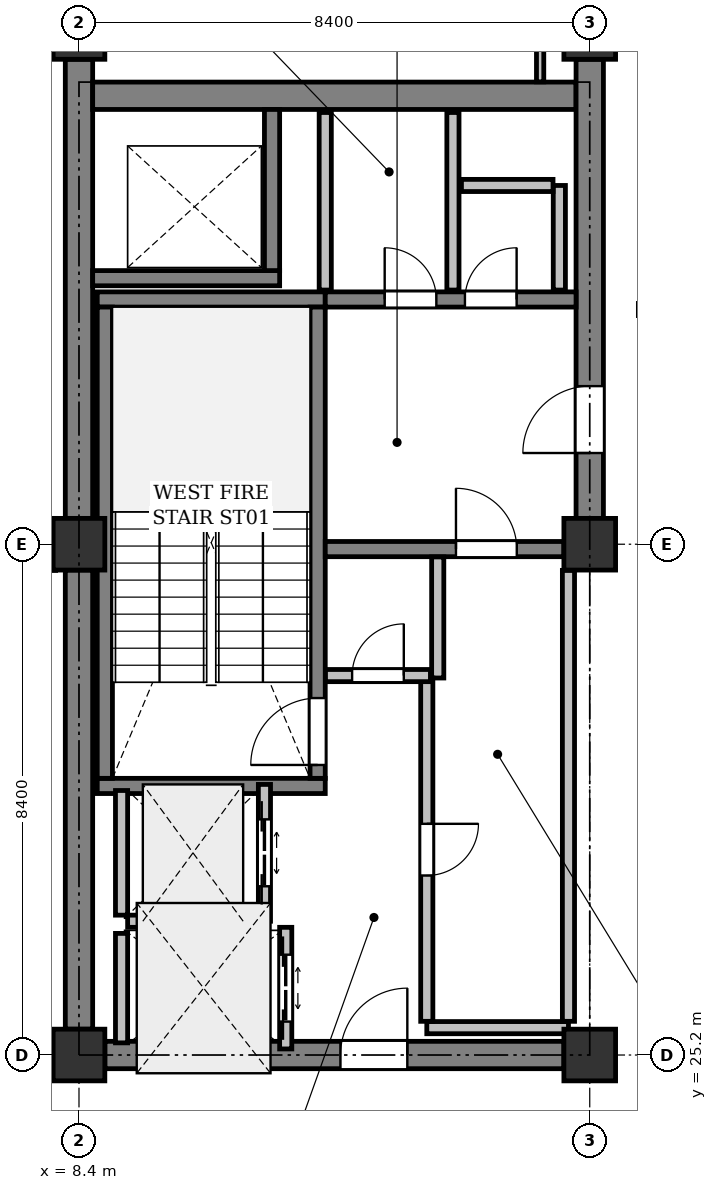
"""IFC4 building model, lengths in metres.
Left out: names, types, materials, properties, quantities, classifications, styles, units other than length and angle.
Written with IfcOpenShell. Run it as: python <this file> out.ifc"""

import sys

from ifc_helpers import new_model, si_unit, direction, frame, frame_2d, origin, origin_2d, place, context, subcontext, project, spatial, rectangle, extrude, element, fill, save


model = new_model("IFC4")
c1 = context("Model", 3, precision=1e-05, world=origin(), true_north=direction((0.0, 1.0)))
c2 = subcontext(c1, "Body", "Model", "MODEL_VIEW")
j1 = project(units=[si_unit("LENGTHUNIT", "METRE"), si_unit("PLANEANGLEUNIT", "RADIAN")], contexts=[c1])
p1 = place(None, origin())
s1 = spatial("IfcSite", under=j1, at=p1, CompositionType="ELEMENT")
p2 = place(p1, origin())
s2 = spatial("IfcBuilding", under=s1, at=p2, CompositionType="ELEMENT")
p3 = place(p2, frame((0.0, 0.0, 274.2)))
s3 = spatial("IfcBuildingStorey", under=s2, at=p3, CompositionType="ELEMENT", Elevation=274.2)
for number, where, z_axis, x_axis in (
    (1, (8.4, 25.2, 0.0), (0.0, 0.0, 1.0), (1.0, 0.0, 0.0)),
    (2, (8.4, 33.6, 0.0), (0.0, 0.0, 1.0), (1.0, 0.0, 0.0)),
    (3, (8.4, 42.0, 0.0), (0.0, 0.0, 1.0), (1.0, 0.0, 0.0)),
    (4, (16.8, 25.2, 0.0), (0.0, 0.0, 1.0), (1.0, 0.0, 0.0)),
    (5, (16.8, 33.6, 0.0), (0.0, 0.0, 1.0), (1.0, 0.0, 0.0)),
    (6, (16.8, 42.0, 0.0), (0.0, 0.0, 1.0), (1.0, 0.0, 0.0)),
):
    element("IfcColumn", number, at=place(p3, frame(where, z_axis=z_axis, x_axis=x_axis)), inside=s3, PredefinedType="COLUMN", context=c2, shape_type="SweptSolid", body=[
        extrude(rectangle(XDim=0.85, YDim=0.85, at=origin_2d()), origin(), (0.0, 0.0, 1.0), 4.0),
    ])
for number, where, z_axis, x_axis in (
    (7, (8.4, 25.625, 0.0), (0.0, 0.0, 1.0), (0.0, 1.0, 0.0)),
    (8, (8.4, 34.025, 0.0), (0.0, 0.0, 1.0), (0.0, 1.0, 0.0)),
):
    element("IfcWall", number, at=place(p3, frame(where, z_axis=z_axis, x_axis=x_axis)), inside=s3, PredefinedType="SHEAR", context=c2, shape_type="SweptSolid", body=[
        extrude(rectangle(XDim=7.55, YDim=0.45, at=frame_2d((3.775, 0.0))), origin(), (0.0, 0.0, 1.0), 3.725),
    ])
p4 = place(p3, frame((8.625, 40.975, 0.0), z_axis=(0.0, 0.0, 1.0), x_axis=(1.0, 0.0, 0.0)))
e9 = element("IfcWall", 9, at=p4, inside=s3, PredefinedType="SHEAR", context=c2, shape_type="SweptSolid", body=[
    extrude(rectangle(XDim=7.95, YDim=0.45, at=frame_2d((3.975, 0.0))), origin(), (0.0, 0.0, 1.0), 3.725),
])
p5 = place(p3, frame((16.8, 34.025, 0.0), z_axis=(0.0, 0.0, 1.0), x_axis=(0.0, 1.0, 0.0)))
e10 = element("IfcWall", 10, at=p5, inside=s3, PredefinedType="SHEAR", context=c2, shape_type="SweptSolid", body=[
    extrude(rectangle(XDim=7.55, YDim=0.45, at=frame_2d((3.775, 0.0))), origin(), (0.0, 0.0, 1.0), 3.725),
])
p6 = place(p5, frame((1.075, 0.0, 0.0)))
e11 = element("IfcOpeningElement", 11, at=p6, cuts=e10, PredefinedType="OPENING", context=c2, shape_type="SweptSolid", body=[
    extrude(rectangle(XDim=1.1, YDim=2.15, at=frame_2d((0.55, 1.075))), frame((0.0, 0.235, 0.0), z_axis=(0.0, -1.0, 0.0), x_axis=(1.0, 0.0, 0.0)), (0.0, 0.0, 1.0), 0.47),
])
p7 = place(p3, frame((8.825, 25.2, 0.0), z_axis=(0.0, 0.0, 1.0), x_axis=(1.0, 0.0, 0.0)))
e12 = element("IfcWall", 12, at=p7, inside=s3, PredefinedType="SHEAR", context=c2, shape_type="SweptSolid", body=[
    extrude(rectangle(XDim=7.55, YDim=0.45, at=frame_2d((3.775, 0.0))), origin(), (0.0, 0.0, 1.0), 3.725),
])
p8 = place(p7, frame((3.875, 0.0, 0.0)))
e13 = element("IfcOpeningElement", 13, at=p8, cuts=e12, PredefinedType="OPENING", context=c2, shape_type="SweptSolid", body=[
    extrude(rectangle(XDim=1.1, YDim=2.15, at=frame_2d((0.55, 1.075))), frame((0.0, 0.235, 0.0), z_axis=(0.0, -1.0, 0.0), x_axis=(1.0, 0.0, 0.0)), (0.0, 0.0, 1.0), 0.47),
])
for number, where, z_axis, x_axis in (
    (14, (12.45, 29.625, 0.0), (0.0, 0.0, 1.0), (-1.0, 0.0, 0.0)),
    (15, (12.45, 37.625, 0.0), (0.0, 0.0, 1.0), (-1.0, 0.0, 0.0)),
):
    element("IfcWall", number, at=place(p3, frame(where, z_axis=z_axis, x_axis=x_axis)), inside=s3, PredefinedType="SHEAR", context=c2, shape_type="SweptSolid", body=[
        extrude(rectangle(XDim=3.75, YDim=0.25, at=frame_2d((1.875, 0.0))), origin(), (0.0, 0.0, 1.0), 3.725),
    ])
p9 = place(p3, frame((12.325, 29.75, 0.0), z_axis=(0.0, 0.0, 1.0), x_axis=(0.0, 1.0, 0.0)))
e16 = element("IfcWall", 16, at=p9, inside=s3, PredefinedType="SHEAR", context=c2, shape_type="SweptSolid", body=[
    extrude(rectangle(XDim=7.75, YDim=0.25, at=frame_2d((3.875, 0.0))), origin(), (0.0, 0.0, 1.0), 3.725),
])
p10 = place(p9, frame((0.22, 0.0, 0.0)))
e17 = element("IfcOpeningElement", 17, at=p10, cuts=e16, PredefinedType="OPENING", context=c2, shape_type="SweptSolid", body=[
    extrude(rectangle(XDim=1.1, YDim=2.15, at=frame_2d((0.55, 1.075))), frame((0.0, 0.135, 0.0), z_axis=(0.0, -1.0, 0.0), x_axis=(1.0, 0.0, 0.0)), (0.0, 0.0, 1.0), 0.27),
])
p11 = place(p3, frame((8.825, 29.75, 0.0), z_axis=(0.0, 0.0, 1.0), x_axis=(0.0, 1.0, 0.0)))
e18 = element("IfcWall", 18, at=p11, inside=s3, PredefinedType="SHEAR", context=c2, shape_type="SweptSolid", body=[
    extrude(rectangle(XDim=7.75, YDim=0.25, at=frame_2d((3.875, 0.0))), origin(), (0.0, 0.0, 1.0), 3.725),
])
p12 = place(p3, frame((8.625, 37.975, 0.0), z_axis=(0.0, 0.0, 1.0), x_axis=(1.0, 0.0, 0.0)))
e19 = element("IfcWall", 19, at=p12, inside=s3, PredefinedType="SHEAR", context=c2, shape_type="SweptSolid", body=[
    extrude(rectangle(XDim=3.075, YDim=0.25, at=frame_2d((1.538, 0.0))), origin(), (0.0, 0.0, 1.0), 3.725),
])
p13 = place(p3, frame((11.575, 38.1, 0.0), z_axis=(0.0, 0.0, 1.0), x_axis=(0.0, 1.0, 0.0)))
e20 = element("IfcWall", 20, at=p13, inside=s3, PredefinedType="SHEAR", context=c2, shape_type="SweptSolid", body=[
    extrude(rectangle(XDim=2.65, YDim=0.25, at=frame_2d((1.325, 0.0))), origin(), (0.0, 0.0, 1.0), 3.725),
])
p14 = place(p3, frame((12.45, 33.52, 0.0), z_axis=(0.0, 0.0, 1.0), x_axis=(1.0, 0.0, 0.0)))
e21 = element("IfcWall", 21, at=p14, inside=s3, PredefinedType="SHEAR", context=c2, shape_type="SweptSolid", body=[
    extrude(rectangle(XDim=3.925, YDim=0.25, at=frame_2d((1.962, 0.0))), origin(), (0.0, 0.0, 1.0), 3.725),
])
p15 = place(p14, frame((2.15, 0.0, 0.0)))
e22 = element("IfcOpeningElement", 22, at=p15, cuts=e21, PredefinedType="OPENING", context=c2, shape_type="SweptSolid", body=[
    extrude(rectangle(XDim=1.0, YDim=2.15, at=frame_2d((0.5, 1.075))), frame((0.0, 0.135, 0.0), z_axis=(0.0, -1.0, 0.0), x_axis=(1.0, 0.0, 0.0)), (0.0, 0.0, 1.0), 0.27),
])
p16 = place(p3, frame((12.45, 37.625, 0.0), z_axis=(0.0, 0.0, 1.0), x_axis=(1.0, 0.0, 0.0)))
e23 = element("IfcWall", 23, at=p16, inside=s3, PredefinedType="SHEAR", context=c2, shape_type="SweptSolid", body=[
    extrude(rectangle(XDim=4.125, YDim=0.25, at=frame_2d((2.062, 0.0))), origin(), (0.0, 0.0, 1.0), 3.725),
])
p17 = place(p16, frame((0.978, 0.0, 0.0)))
e24 = element("IfcOpeningElement", 24, at=p17, cuts=e23, PredefinedType="OPENING", context=c2, shape_type="SweptSolid", body=[
    extrude(rectangle(XDim=0.85, YDim=2.15, at=frame_2d((0.425, 1.075))), frame((0.0, 0.135, 0.0), z_axis=(0.0, -1.0, 0.0), x_axis=(1.0, 0.0, 0.0)), (0.0, 0.0, 1.0), 0.27),
])
p18 = place(p16, frame((2.298, 0.0, 0.0)))
e25 = element("IfcOpeningElement", 25, at=p18, cuts=e23, PredefinedType="OPENING", context=c2, shape_type="SweptSolid", body=[
    extrude(rectangle(XDim=0.85, YDim=2.15, at=frame_2d((0.425, 1.075))), frame((0.0, 0.135, 0.0), z_axis=(0.0, -1.0, 0.0), x_axis=(1.0, 0.0, 0.0)), (0.0, 0.0, 1.0), 0.27),
])
p19 = place(p3, frame((11.45, 27.4, 0.0), z_axis=(0.0, 0.0, 1.0), x_axis=(0.0, 1.0, 0.0)))
e26 = element("IfcWall", 26, at=p19, inside=s3, PredefinedType="PARTITIONING", context=c2, shape_type="SweptSolid", body=[
    extrude(rectangle(XDim=2.25, YDim=0.2, at=frame_2d((1.125, 0.0))), origin(), (0.0, 0.0, 1.0), 3.725),
])
p20 = place(p19, frame((0.575, 0.0, 0.0)))
e27 = element("IfcOpeningElement", 27, at=p20, cuts=e26, PredefinedType="OPENING", context=c2, shape_type="SweptSolid", body=[
    extrude(rectangle(XDim=1.1, YDim=2.2, at=frame_2d((0.55, 1.1))), frame((0.0, 0.11, 0.0), z_axis=(0.0, -1.0, 0.0), x_axis=(1.0, 0.0, 0.0)), (0.0, 0.0, 1.0), 0.22),
])
p21 = place(p3, frame((9.1, 27.5, 0.0), z_axis=(0.0, 0.0, 1.0), x_axis=(0.0, 1.0, 0.0)))
e28 = element("IfcWall", 28, at=p21, inside=s3, PredefinedType="PARTITIONING", context=c2, shape_type="SweptSolid", body=[
    extrude(rectangle(XDim=2.05, YDim=0.2, at=frame_2d((1.025, 0.0))), origin(), (0.0, 0.0, 1.0), 3.725),
])
p22 = place(p3, frame((9.2, 27.4, 0.0), z_axis=(0.0, 0.0, 1.0), x_axis=(1.0, 0.0, 0.0)))
e29 = element("IfcWall", 29, at=p22, inside=s3, PredefinedType="PARTITIONING", context=c2, shape_type="SweptSolid", body=[
    extrude(rectangle(XDim=2.15, YDim=0.2, at=frame_2d((1.075, 0.0))), origin(), (0.0, 0.0, 1.0), 3.725),
])
p23 = place(p3, frame((11.8, 25.3, 0.0), z_axis=(0.0, 0.0, 1.0), x_axis=(0.0, 1.0, 0.0)))
e30 = element("IfcWall", 30, at=p23, inside=s3, PredefinedType="PARTITIONING", context=c2, shape_type="SweptSolid", body=[
    extrude(rectangle(XDim=2.0, YDim=0.2, at=frame_2d((1.0, 0.0))), origin(), (0.0, 0.0, 1.0), 3.725),
])
p24 = place(p23, frame((0.45, 0.0, 0.0)))
e31 = element("IfcOpeningElement", 31, at=p24, cuts=e30, PredefinedType="OPENING", context=c2, shape_type="SweptSolid", body=[
    extrude(rectangle(XDim=1.1, YDim=2.2, at=frame_2d((0.55, 1.1))), frame((0.0, 0.11, 0.0), z_axis=(0.0, -1.0, 0.0), x_axis=(1.0, 0.0, 0.0)), (0.0, 0.0, 1.0), 0.22),
])
p25 = place(p3, frame((9.1, 25.4, 0.0), z_axis=(0.0, 0.0, 1.0), x_axis=(0.0, 1.0, 0.0)))
e32 = element("IfcWall", 32, at=p25, inside=s3, PredefinedType="PARTITIONING", context=c2, shape_type="SweptSolid", body=[
    extrude(rectangle(XDim=1.8, YDim=0.2, at=frame_2d((0.9, 0.0))), origin(), (0.0, 0.0, 1.0), 3.725),
])
p26 = place(p3, frame((14.12, 25.65, 0.0), z_axis=(0.0, 0.0, 1.0), x_axis=(1.0, 0.0, 0.0)))
e33 = element("IfcWall", 33, at=p26, inside=s3, PredefinedType="PARTITIONING", context=c2, shape_type="SweptSolid", body=[
    extrude(rectangle(XDim=2.33, YDim=0.2, at=frame_2d((1.165, 0.0))), origin(), (0.0, 0.0, 1.0), 3.725),
])
p27 = place(p3, frame((16.45, 25.754, 0.0), z_axis=(0.0, 0.0, 1.0), x_axis=(0.0, 1.0, 0.0)))
e34 = element("IfcWall", 34, at=p27, inside=s3, PredefinedType="PARTITIONING", context=c2, shape_type="SweptSolid", body=[
    extrude(rectangle(XDim=7.416, YDim=0.2, at=frame_2d((3.708, 0.0))), origin(), (0.0, 0.0, 1.0), 3.725),
])
p28 = place(p3, frame((14.3, 33.391, 0.0), z_axis=(0.0, 0.0, 1.0), x_axis=(0.0, -1.0, 0.0)))
e35 = element("IfcWall", 35, at=p28, inside=s3, PredefinedType="PARTITIONING", context=c2, shape_type="SweptSolid", body=[
    extrude(rectangle(XDim=1.991, YDim=0.2, at=frame_2d((0.996, 0.0))), origin(), (0.0, 0.0, 1.0), 3.725),
])
p29 = place(p3, frame((14.12, 31.4, 0.0), z_axis=(0.0, 0.0, 1.0), x_axis=(0.0, -1.0, 0.0)))
e36 = element("IfcWall", 36, at=p29, inside=s3, PredefinedType="PARTITIONING", context=c2, shape_type="SweptSolid", body=[
    extrude(rectangle(XDim=5.646, YDim=0.2, at=frame_2d((2.823, 0.0))), origin(), (0.0, 0.0, 1.0), 3.725),
])
p30 = place(p29, frame((2.398, 0.0, 0.0)))
e37 = element("IfcOpeningElement", 37, at=p30, cuts=e36, PredefinedType="OPENING", context=c2, shape_type="SweptSolid", body=[
    extrude(rectangle(XDim=0.85, YDim=2.15, at=frame_2d((0.425, 1.075))), frame((0.0, 0.11, 0.0), z_axis=(0.0, -1.0, 0.0), x_axis=(1.0, 0.0, 0.0)), (0.0, 0.0, 1.0), 0.22),
])
p31 = place(p3, frame((12.454, 31.44, 0.0), z_axis=(0.0, 0.0, 1.0), x_axis=(1.0, 0.0, 0.0)))
e38 = element("IfcWall", 38, at=p31, inside=s3, PredefinedType="PARTITIONING", context=c2, shape_type="SweptSolid", body=[
    extrude(rectangle(XDim=1.726, YDim=0.2, at=frame_2d((0.863, 0.0))), origin(), (0.0, 0.0, 1.0), 3.725),
])
p32 = place(p31, frame((0.438, 0.0, 0.0)))
e39 = element("IfcOpeningElement", 39, at=p32, cuts=e38, PredefinedType="OPENING", context=c2, shape_type="SweptSolid", body=[
    extrude(rectangle(XDim=0.85, YDim=2.15, at=frame_2d((0.425, 1.075))), frame((0.0, 0.11, 0.0), z_axis=(0.0, -1.0, 0.0), x_axis=(1.0, 0.0, 0.0)), (0.0, 0.0, 1.0), 0.22),
])
for number, where, z_axis, x_axis in (
    (40, (14.55, 37.78, 0.0), (0.0, 0.0, 1.0), (0.0, 1.0, 0.0)),
    (41, (12.45, 40.7, 0.0), (0.0, 0.0, 1.0), (0.0, -1.0, 0.0)),
):
    element("IfcWall", number, at=place(p3, frame(where, z_axis=z_axis, x_axis=x_axis)), inside=s3, PredefinedType="PARTITIONING", context=c2, shape_type="SweptSolid", body=[
        extrude(rectangle(XDim=2.92, YDim=0.2, at=frame_2d((1.46, 0.0))), origin(), (0.0, 0.0, 1.0), 2.775),
    ])
p33 = place(p3, frame((16.3, 37.78, 0.0), z_axis=(0.0, 0.0, 1.0), x_axis=(0.0, 1.0, 0.0)))
e42 = element("IfcWall", 42, at=p33, inside=s3, PredefinedType="PARTITIONING", context=c2, shape_type="SweptSolid", body=[
    extrude(rectangle(XDim=1.72, YDim=0.2, at=frame_2d((0.86, 0.0))), origin(), (0.0, 0.0, 1.0), 2.775),
])
p34 = place(p3, frame((16.196, 39.5, 0.0), z_axis=(0.0, 0.0, 1.0), x_axis=(-1.0, 0.0, 0.0)))
e43 = element("IfcWall", 43, at=p34, inside=s3, PredefinedType="PARTITIONING", context=c2, shape_type="SweptSolid", body=[
    extrude(rectangle(XDim=1.506, YDim=0.2, at=frame_2d((0.753, 0.0))), origin(), (0.0, 0.0, 1.0), 2.775),
])
p35 = place(p3, frame((7.956, 33.169, 0.0), z_axis=(0.0, 0.0, 1.0), x_axis=(-0.000855919801, 0.999999633701, 0.0)))
e44 = element("IfcWall", 44, at=p35, inside=s3, PredefinedType="PARTITIONING", context=c2, shape_type="SweptSolid", body=[
    extrude(rectangle(XDim=0.856, YDim=0.12, at=frame_2d((0.428, 0.0))), origin(), (0.0, 0.0, 1.0), 3.271),
])
p36 = place(p3, frame((15.984, 41.204, 0.0), z_axis=(0.0, 0.0, 1.0), x_axis=(0.0, 1.0, 0.0)))
e45 = element("IfcWall", 45, at=p36, inside=s3, PredefinedType="PARTITIONING", context=c2, shape_type="SweptSolid", body=[
    extrude(rectangle(XDim=0.627, YDim=0.12, at=frame_2d((0.313, 0.0))), origin(), (0.0, 0.0, 1.0), 3.725),
])
p37 = place(p3, frame((5.4, 25.26, 0.0), z_axis=(0.0, 0.0, 1.0), x_axis=(1.0, 0.0, 0.0)))
e46 = element("IfcWall", 46, at=p37, inside=s3, PredefinedType="PARTITIONING", context=c2, shape_type="SweptSolid", body=[
    extrude(rectangle(XDim=2.555, YDim=0.12, at=frame_2d((1.278, 0.0))), origin(), (0.0, 0.0, 1.0), 3.271),
])
p38 = place(p6, origin())
e47 = element("IfcDoor", 47, at=p38, inside=s3, OperationType="SINGLE_SWING_LEFT", PredefinedType="DOOR", context=c2, shape_type="SweptSolid", body=[
    extrude(rectangle(XDim=1.1, YDim=2.15, at=frame_2d((0.55, 1.075))), frame((0.0, 0.025, 0.0), z_axis=(0.0, -1.0, 0.0), x_axis=(1.0, 0.0, 0.0)), (0.0, 0.0, 1.0), 0.05),
])
fill(e11, e47)
p39 = place(p8, origin())
e48 = element("IfcDoor", 48, at=p39, inside=s3, OperationType="SINGLE_SWING_RIGHT", PredefinedType="DOOR", context=c2, shape_type="SweptSolid", body=[
    extrude(rectangle(XDim=1.1, YDim=2.15, at=frame_2d((0.55, 1.075))), frame((0.0, 0.025, 0.0), z_axis=(0.0, -1.0, 0.0), x_axis=(1.0, 0.0, 0.0)), (0.0, 0.0, 1.0), 0.05),
])
fill(e13, e48)
p40 = place(p10, origin())
e49 = element("IfcDoor", 49, at=p40, inside=s3, OperationType="SINGLE_SWING_LEFT", PredefinedType="DOOR", context=c2, shape_type="SweptSolid", body=[
    extrude(rectangle(XDim=1.1, YDim=2.15, at=frame_2d((0.55, 1.075))), frame((0.0, 0.025, 0.0), z_axis=(0.0, -1.0, 0.0), x_axis=(1.0, 0.0, 0.0)), (0.0, 0.0, 1.0), 0.05),
])
fill(e17, e49)
p41 = place(p15, origin())
e50 = element("IfcDoor", 50, at=p41, inside=s3, OperationType="SINGLE_SWING_LEFT", PredefinedType="DOOR", context=c2, shape_type="SweptSolid", body=[
    extrude(rectangle(XDim=1.0, YDim=2.15, at=frame_2d((0.5, 1.075))), frame((0.0, 0.025, 0.0), z_axis=(0.0, -1.0, 0.0), x_axis=(1.0, 0.0, 0.0)), (0.0, 0.0, 1.0), 0.05),
])
fill(e22, e50)
p42 = place(p20, origin())
e51 = element("IfcDoor", 51, at=p42, inside=s3, OperationType="DOUBLE_DOOR_SLIDING", PredefinedType="DOOR", context=c2, shape_type="SweptSolid", body=[
    extrude(rectangle(XDim=1.1, YDim=2.2, at=frame_2d((0.55, 1.1))), frame((0.0, 0.025, 0.0), z_axis=(0.0, -1.0, 0.0), x_axis=(1.0, 0.0, 0.0)), (0.0, 0.0, 1.0), 0.05),
])
fill(e27, e51)
p43 = place(p24, origin())
e52 = element("IfcDoor", 52, at=p43, inside=s3, OperationType="DOUBLE_DOOR_SLIDING", PredefinedType="DOOR", context=c2, shape_type="SweptSolid", body=[
    extrude(rectangle(XDim=1.1, YDim=2.2, at=frame_2d((0.55, 1.1))), frame((0.0, 0.025, 0.0), z_axis=(0.0, -1.0, 0.0), x_axis=(1.0, 0.0, 0.0)), (0.0, 0.0, 1.0), 0.05),
])
fill(e31, e52)
p44 = place(p30, origin())
e53 = element("IfcDoor", 53, at=p44, inside=s3, OperationType="SINGLE_SWING_LEFT", PredefinedType="DOOR", context=c2, shape_type="SweptSolid", body=[
    extrude(rectangle(XDim=0.85, YDim=2.15, at=frame_2d((0.425, 1.075))), frame((0.0, 0.025, 0.0), z_axis=(0.0, -1.0, 0.0), x_axis=(1.0, 0.0, 0.0)), (0.0, 0.0, 1.0), 0.05),
])
fill(e37, e53)
p45 = place(p32, origin())
e54 = element("IfcDoor", 54, at=p45, inside=s3, OperationType="SINGLE_SWING_RIGHT", PredefinedType="DOOR", context=c2, shape_type="SweptSolid", body=[
    extrude(rectangle(XDim=0.85, YDim=2.15, at=frame_2d((0.425, 1.075))), frame((0.0, 0.025, 0.0), z_axis=(0.0, -1.0, 0.0), x_axis=(1.0, 0.0, 0.0)), (0.0, 0.0, 1.0), 0.05),
])
fill(e39, e54)
p46 = place(p17, origin())
e55 = element("IfcDoor", 55, at=p46, inside=s3, OperationType="SINGLE_SWING_LEFT", PredefinedType="DOOR", context=c2, shape_type="SweptSolid", body=[
    extrude(rectangle(XDim=0.85, YDim=2.15, at=frame_2d((0.425, 1.075))), frame((0.0, 0.025, 0.0), z_axis=(0.0, -1.0, 0.0), x_axis=(1.0, 0.0, 0.0)), (0.0, 0.0, 1.0), 0.05),
])
fill(e24, e55)
p47 = place(p18, origin())
e56 = element("IfcDoor", 56, at=p47, inside=s3, OperationType="SINGLE_SWING_RIGHT", PredefinedType="DOOR", context=c2, shape_type="SweptSolid", body=[
    extrude(rectangle(XDim=0.85, YDim=2.15, at=frame_2d((0.425, 1.075))), frame((0.0, 0.025, 0.0), z_axis=(0.0, -1.0, 0.0), x_axis=(1.0, 0.0, 0.0)), (0.0, 0.0, 1.0), 0.05),
])
fill(e25, e56)
save(model, sys.argv[1])
